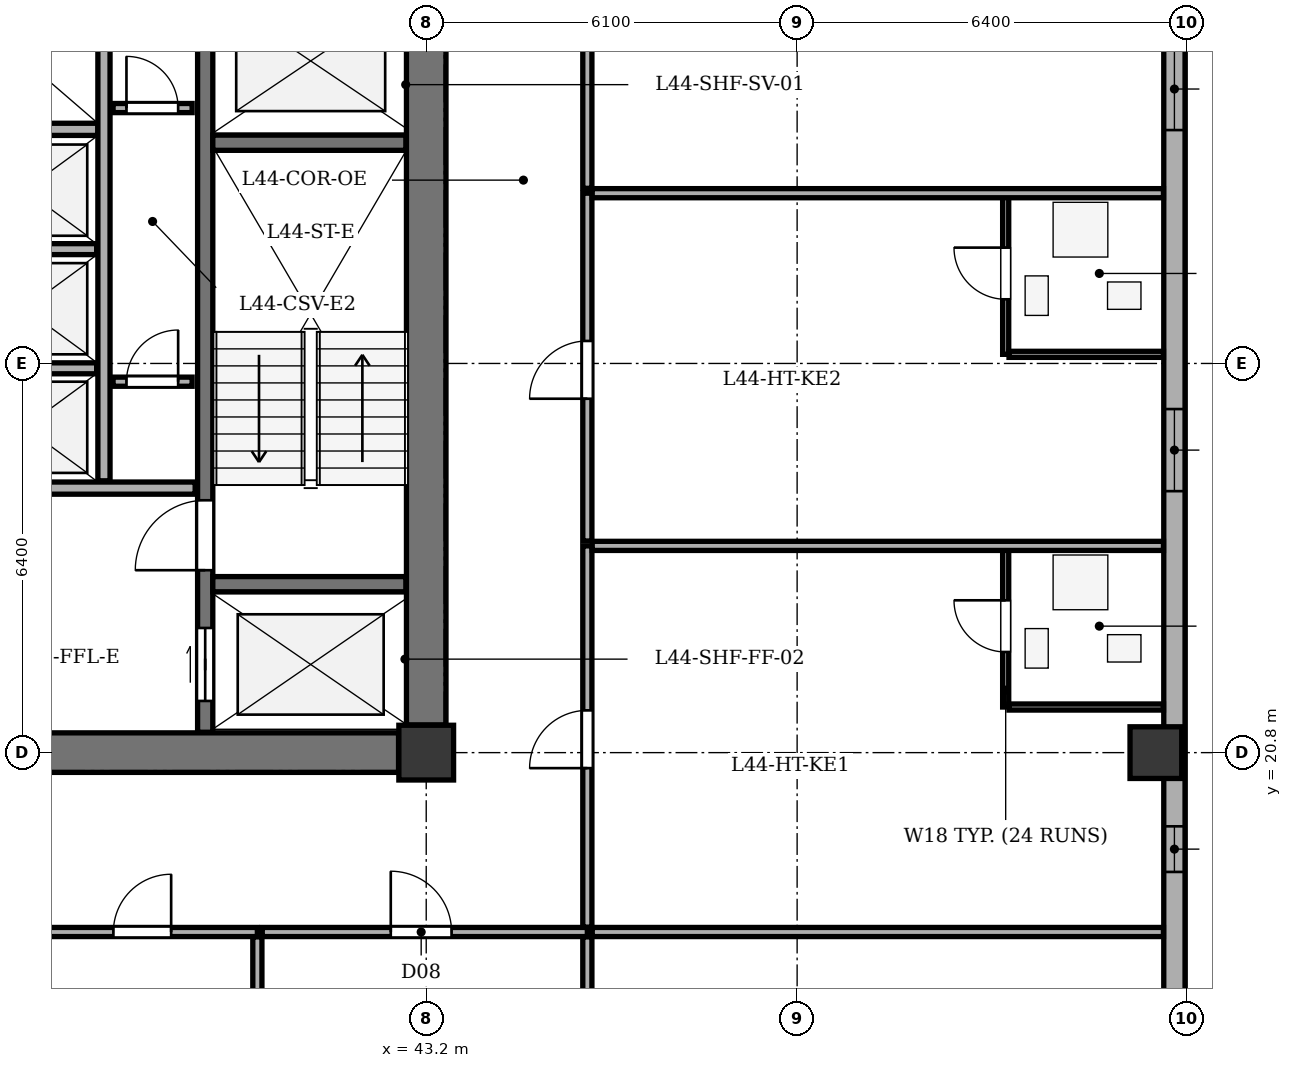
"""IFC4 building model, lengths in metres.
Left out: names, types, materials, properties, quantities, classifications, styles, units other than length and angle.
Written with IfcOpenShell. Run it as: python <this file> out.ifc"""

import sys

from ifc_helpers import new_model, si_unit, direction, frame, frame_2d, origin, origin_2d, place, context, subcontext, project, spatial, rectangle, extrude, element, fill, save


model = new_model("IFC4")
c1 = context("Model", 3, precision=1e-05, world=origin(), true_north=direction((0.0, 1.0)))
c2 = subcontext(c1, "Body", "Model", "MODEL_VIEW")
j1 = project(units=[si_unit("LENGTHUNIT", "METRE"), si_unit("PLANEANGLEUNIT", "RADIAN")], contexts=[c1])
p1 = place(None, origin())
s1 = spatial("IfcSite", under=j1, at=p1, CompositionType="ELEMENT")
p2 = place(p1, origin())
s2 = spatial("IfcBuilding", under=s1, at=p2, CompositionType="ELEMENT")
p3 = place(p2, frame((0.0, 0.0, 172.8)))
s3 = spatial("IfcBuildingStorey", under=s2, at=p3, CompositionType="ELEMENT", Elevation=172.8)
p4 = place(p3, frame((43.2, 20.8, 0.0), z_axis=(0.0, 0.0, 1.0), x_axis=(1.0, 0.0, 0.0)))
e1 = element("IfcColumn", 1, at=p4, inside=s3, PredefinedType="COLUMN", context=c2, shape_type="SweptSolid", body=[
    extrude(rectangle(XDim=0.9, YDim=0.9, at=origin_2d()), origin(), (0.0, 0.0, 1.0), 3.5),
])
p5 = place(p3, frame((55.2, 20.8, 0.0), z_axis=(0.0, 0.0, 1.0), x_axis=(1.0, 0.0, 0.0)))
e2 = element("IfcColumn", 2, at=p5, inside=s3, PredefinedType="COLUMN", context=c2, shape_type="SweptSolid", body=[
    extrude(rectangle(XDim=0.85, YDim=0.85, at=origin_2d()), origin(), (0.0, 0.0, 1.0), 3.5),
])
p6 = place(p3, frame((55.505, 47.9, 0.0), z_axis=(0.0, 0.0, 1.0), x_axis=(0.0, -1.0, 0.0)))
e3 = element("IfcWall", 3, at=p6, inside=s3, PredefinedType="STANDARD", context=c2, shape_type="SweptSolid", body=[
    extrude(rectangle(XDim=35.0, YDim=0.35, at=frame_2d((17.5, 0.0))), origin(), (0.0, 0.0, 1.0), 2.785),
])
p7 = place(p6, frame((2.595, 0.0, 0.75)))
e4 = element("IfcOpeningElement", 4, at=p7, cuts=e3, PredefinedType="OPENING", context=c2, shape_type="SweptSolid", body=[
    extrude(rectangle(XDim=1.6, YDim=1.75, at=frame_2d((0.8, 0.875))), frame((0.0, 0.185, 0.0), z_axis=(0.0, -1.0, 0.0), x_axis=(1.0, 0.0, 0.0)), (0.0, 0.0, 1.0), 0.37),
])
p8 = place(p6, frame((7.181, 0.0, 0.75)))
e5 = element("IfcOpeningElement", 5, at=p8, cuts=e3, PredefinedType="OPENING", context=c2, shape_type="SweptSolid", body=[
    extrude(rectangle(XDim=2.1, YDim=1.75, at=frame_2d((1.05, 0.875))), frame((0.0, 0.185, 0.0), z_axis=(0.0, -1.0, 0.0), x_axis=(1.0, 0.0, 0.0)), (0.0, 0.0, 1.0), 0.37),
])
p9 = place(p6, frame((15.512, 0.0, 0.75)))
e6 = element("IfcOpeningElement", 6, at=p9, cuts=e3, PredefinedType="OPENING", context=c2, shape_type="SweptSolid", body=[
    extrude(rectangle(XDim=1.35, YDim=1.75, at=frame_2d((0.675, 0.875))), frame((0.0, 0.185, 0.0), z_axis=(0.0, -1.0, 0.0), x_axis=(1.0, 0.0, 0.0)), (0.0, 0.0, 1.0), 0.37),
])
p10 = place(p6, frame((21.45, 0.0, 0.75)))
e7 = element("IfcOpeningElement", 7, at=p10, cuts=e3, PredefinedType="OPENING", context=c2, shape_type="SweptSolid", body=[
    extrude(rectangle(XDim=1.35, YDim=1.75, at=frame_2d((0.675, 0.875))), frame((0.0, 0.185, 0.0), z_axis=(0.0, -1.0, 0.0), x_axis=(1.0, 0.0, 0.0)), (0.0, 0.0, 1.0), 0.37),
])
p11 = place(p6, frame((31.588, 0.0, 0.75)))
e8 = element("IfcOpeningElement", 8, at=p11, cuts=e3, PredefinedType="OPENING", context=c2, shape_type="SweptSolid", body=[
    extrude(rectangle(XDim=1.6, YDim=1.75, at=frame_2d((0.8, 0.875))), frame((0.0, 0.185, 0.0), z_axis=(0.0, -1.0, 0.0), x_axis=(1.0, 0.0, 0.0)), (0.0, 0.0, 1.0), 0.37),
])
p12 = place(p6, frame((28.312, 0.0, 0.75)))
e9 = element("IfcOpeningElement", 9, at=p12, cuts=e3, PredefinedType="OPENING", context=c2, shape_type="SweptSolid", body=[
    extrude(rectangle(XDim=0.75, YDim=1.45, at=frame_2d((0.375, 0.725))), frame((0.0, 0.185, 0.0), z_axis=(0.0, -1.0, 0.0), x_axis=(1.0, 0.0, 0.0)), (0.0, 0.0, 1.0), 0.37),
])
p13 = place(p3, frame((43.2, 21.255, 0.0), z_axis=(0.0, 0.0, 1.0), x_axis=(0.0, 1.0, 0.0)))
e10 = element("IfcWall", 10, at=p13, inside=s3, PredefinedType="SHEAR", context=c2, shape_type="SweptSolid", body=[
    extrude(rectangle(XDim=11.89, YDim=0.65, at=frame_2d((5.945, 0.0))), origin(), (0.0, 0.0, 1.0), 3.2),
])
p14 = place(p3, frame((35.655, 20.8, 0.0), z_axis=(0.0, 0.0, 1.0), x_axis=(1.0, 0.0, 0.0)))
e11 = element("IfcWall", 11, at=p14, inside=s3, PredefinedType="SHEAR", context=c2, shape_type="SweptSolid", body=[
    extrude(rectangle(XDim=7.09, YDim=0.65, at=frame_2d((3.545, 0.0))), origin(), (0.0, 0.0, 1.0), 3.2),
])
p15 = place(p3, frame((39.565, 21.135, 0.0), z_axis=(0.0, 0.0, 1.0), x_axis=(0.0, 1.0, 0.0)))
e12 = element("IfcWall", 12, at=p15, inside=s3, PredefinedType="SHEAR", context=c2, shape_type="SweptSolid", body=[
    extrude(rectangle(XDim=12.13, YDim=0.25, at=frame_2d((6.065, 0.0))), origin(), (0.0, 0.0, 1.0), 3.2),
])
p16 = place(p15, frame((0.515, 0.0, 0.0)))
e13 = element("IfcOpeningElement", 13, at=p16, cuts=e12, PredefinedType="OPENING", context=c2, shape_type="SweptSolid", body=[
    extrude(rectangle(XDim=1.2, YDim=2.15, at=frame_2d((0.6, 1.075))), frame((0.0, 0.135, 0.0), z_axis=(0.0, -1.0, 0.0), x_axis=(1.0, 0.0, 0.0)), (0.0, 0.0, 1.0), 0.27),
])
p17 = place(p15, frame((2.665, 0.0, 0.0)))
e14 = element("IfcOpeningElement", 14, at=p17, cuts=e12, PredefinedType="OPENING", context=c2, shape_type="SweptSolid", body=[
    extrude(rectangle(XDim=1.15, YDim=2.15, at=frame_2d((0.575, 1.075))), frame((0.0, 0.135, 0.0), z_axis=(0.0, -1.0, 0.0), x_axis=(1.0, 0.0, 0.0)), (0.0, 0.0, 1.0), 0.27),
])
for number, where, z_axis, x_axis in (
    (15, (39.69, 23.57, 0.0), (0.0, 0.0, 1.0), (1.0, 0.0, 0.0)),
    (16, (39.69, 30.83, 0.0), (0.0, 0.0, 1.0), (1.0, 0.0, 0.0)),
):
    element("IfcWall", number, at=place(p3, frame(where, z_axis=z_axis, x_axis=x_axis)), inside=s3, PredefinedType="SHEAR", context=c2, shape_type="SweptSolid", body=[
        extrude(rectangle(XDim=3.175, YDim=0.25, at=frame_2d((1.587, 0.0))), origin(), (0.0, 0.0, 1.0), 3.2),
    ])
p18 = place(p3, frame((35.535, 25.15, 0.0), z_axis=(0.0, 0.0, 1.0), x_axis=(1.0, 0.0, 0.0)))
e17 = element("IfcWall", 17, at=p18, inside=s3, PredefinedType="SOLIDWALL", context=c2, shape_type="SweptSolid", body=[
    extrude(rectangle(XDim=3.865, YDim=0.2, at=frame_2d((1.933, 0.0))), origin(), (0.0, 0.0, 1.0), 3.2),
])
p19 = place(p3, frame((35.55, 31.05, 0.0), z_axis=(0.0, 0.0, 1.0), x_axis=(1.0, 0.0, 0.0)))
e18 = element("IfcWall", 18, at=p19, inside=s3, PredefinedType="SOLIDWALL", context=c2, shape_type="SweptSolid", body=[
    extrude(rectangle(XDim=2.25, YDim=0.2, at=frame_2d((1.125, 0.0))), origin(), (0.0, 0.0, 1.0), 3.2),
])
p20 = place(p3, frame((37.9, 25.27, 0.0), z_axis=(0.0, 0.0, 1.0), x_axis=(0.0, 1.0, 0.0)))
e19 = element("IfcWall", 19, at=p20, inside=s3, PredefinedType="SOLIDWALL", context=c2, shape_type="SweptSolid", body=[
    extrude(rectangle(XDim=7.995, YDim=0.2, at=frame_2d((3.998, 0.0))), origin(), (0.0, 0.0, 1.0), 3.2),
])
for number, where, z_axis, x_axis in (
    (20, (35.535, 27.12, 0.0), (0.0, 0.0, 1.0), (1.0, 0.0, 0.0)),
    (21, (35.535, 29.08, 0.0), (0.0, 0.0, 1.0), (1.0, 0.0, 0.0)),
):
    element("IfcWall", number, at=place(p3, frame(where, z_axis=z_axis, x_axis=x_axis)), inside=s3, PredefinedType="PARTITIONING", context=c2, shape_type="SweptSolid", body=[
        extrude(rectangle(XDim=2.245, YDim=0.18, at=frame_2d((1.123, 0.0))), origin(), (0.0, 0.0, 1.0), 3.2),
    ])
p21 = place(p3, frame((38.05, 26.9, 0.0), z_axis=(0.0, 0.0, 1.0), x_axis=(1.0, 0.0, 0.0)))
e22 = element("IfcWall", 22, at=p21, inside=s3, PredefinedType="PARTITIONING", context=c2, shape_type="SweptSolid", body=[
    extrude(rectangle(XDim=1.3, YDim=0.15, at=frame_2d((0.65, 0.0))), origin(), (0.0, 0.0, 1.0), 3.2),
])
p22 = place(p21, frame((0.22, 0.0, 0.0)))
e23 = element("IfcOpeningElement", 23, at=p22, cuts=e22, PredefinedType="OPENING", context=c2, shape_type="SweptSolid", body=[
    extrude(rectangle(XDim=0.85, YDim=2.02, at=frame_2d((0.425, 1.01))), frame((0.0, 0.085, 0.0), z_axis=(0.0, -1.0, 0.0), x_axis=(1.0, 0.0, 0.0)), (0.0, 0.0, 1.0), 0.17),
])
p23 = place(p3, frame((38.05, 31.4, 0.0), z_axis=(0.0, 0.0, 1.0), x_axis=(1.0, 0.0, 0.0)))
e24 = element("IfcWall", 24, at=p23, inside=s3, PredefinedType="PARTITIONING", context=c2, shape_type="SweptSolid", body=[
    extrude(rectangle(XDim=1.3, YDim=0.15, at=frame_2d((0.65, 0.0))), origin(), (0.0, 0.0, 1.0), 3.2),
])
p24 = place(p23, frame((0.22, 0.0, 0.0)))
e25 = element("IfcOpeningElement", 25, at=p24, cuts=e24, PredefinedType="OPENING", context=c2, shape_type="SweptSolid", body=[
    extrude(rectangle(XDim=0.85, YDim=2.02, at=frame_2d((0.425, 1.01))), frame((0.0, 0.085, 0.0), z_axis=(0.0, -1.0, 0.0), x_axis=(1.0, 0.0, 0.0)), (0.0, 0.0, 1.0), 0.17),
])
p25 = place(p3, frame((36.646, 17.85, 0.0), z_axis=(0.0, 0.0, 1.0), x_axis=(1.0, 0.0, 0.0)))
e26 = element("IfcWall", 26, at=p25, inside=s3, PredefinedType="PARTITIONING", context=c2, shape_type="SweptSolid", body=[
    extrude(rectangle(XDim=3.777, YDim=0.15, at=frame_2d((1.889, 0.0))), origin(), (0.0, 0.0, 1.0), 3.2),
])
p26 = place(p25, frame((1.409, 0.0, 0.0)))
e27 = element("IfcOpeningElement", 27, at=p26, cuts=e26, PredefinedType="OPENING", context=c2, shape_type="SweptSolid", body=[
    extrude(rectangle(XDim=0.95, YDim=2.1, at=frame_2d((0.475, 1.05))), frame((0.0, 0.085, 0.0), z_axis=(0.0, -1.0, 0.0), x_axis=(1.0, 0.0, 0.0)), (0.0, 0.0, 1.0), 0.17),
])
p27 = place(p3, frame((40.423, 8.275, 0.0), z_axis=(0.0, 0.0, 1.0), x_axis=(0.0, 1.0, 0.0)))
e28 = element("IfcWall", 28, at=p27, inside=s3, PredefinedType="PARTITIONING", context=c2, shape_type="SweptSolid", body=[
    extrude(rectangle(XDim=9.495, YDim=0.15, at=frame_2d((4.748, 0.0))), origin(), (0.0, 0.0, 1.0), 3.2),
])
p28 = place(p3, frame((40.503, 17.85, 0.0), z_axis=(0.0, 0.0, 1.0), x_axis=(1.0, 0.0, 0.0)))
e29 = element("IfcWall", 29, at=p28, inside=s3, PredefinedType="PARTITIONING", context=c2, shape_type="SweptSolid", body=[
    extrude(rectangle(XDim=5.347, YDim=0.15, at=frame_2d((2.674, 0.0))), origin(), (0.0, 0.0, 1.0), 3.2),
])
p29 = place(p28, frame((2.114, 0.0, 0.0)))
e30 = element("IfcOpeningElement", 30, at=p29, cuts=e29, PredefinedType="OPENING", context=c2, shape_type="SweptSolid", body=[
    extrude(rectangle(XDim=1.0, YDim=2.1, at=frame_2d((0.5, 1.05))), frame((0.0, 0.085, 0.0), z_axis=(0.0, -1.0, 0.0), x_axis=(1.0, 0.0, 0.0)), (0.0, 0.0, 1.0), 0.17),
])
p30 = place(p3, frame((45.85, 8.275, 0.0), z_axis=(0.0, 0.0, 1.0), x_axis=(0.0, 1.0, 0.0)))
e31 = element("IfcWall", 31, at=p30, inside=s3, PredefinedType="PARTITIONING", context=c2, shape_type="SweptSolid", body=[
    extrude(rectangle(XDim=9.495, YDim=0.15, at=frame_2d((4.748, 0.0))), origin(), (0.0, 0.0, 1.0), 3.2),
])
p31 = place(p3, frame((45.93, 17.85, 0.0), z_axis=(0.0, 0.0, 1.0), x_axis=(1.0, 0.0, 0.0)))
e32 = element("IfcWall", 32, at=p31, inside=s3, PredefinedType="PARTITIONING", context=c2, shape_type="SweptSolid", body=[
    extrude(rectangle(XDim=9.395, YDim=0.15, at=frame_2d((4.698, 0.0))), origin(), (0.0, 0.0, 1.0), 3.2),
])
p32 = place(p3, frame((45.85, 17.93, 0.0), z_axis=(0.0, 0.0, 1.0), x_axis=(0.0, 1.0, 0.0)))
e33 = element("IfcWall", 33, at=p32, inside=s3, PredefinedType="PARTITIONING", context=c2, shape_type="SweptSolid", body=[
    extrude(rectangle(XDim=6.27, YDim=0.15, at=frame_2d((3.135, 0.0))), origin(), (0.0, 0.0, 1.0), 3.2),
])
p33 = place(p32, frame((2.615, 0.0, 0.0)))
e34 = element("IfcOpeningElement", 34, at=p33, cuts=e33, PredefinedType="OPENING", context=c2, shape_type="SweptSolid", body=[
    extrude(rectangle(XDim=0.95, YDim=2.1, at=frame_2d((0.475, 1.05))), frame((0.0, 0.085, 0.0), z_axis=(0.0, -1.0, 0.0), x_axis=(1.0, 0.0, 0.0)), (0.0, 0.0, 1.0), 0.17),
])
p34 = place(p3, frame((52.73, 21.55, 0.0), z_axis=(0.0, 0.0, 1.0), x_axis=(0.0, 1.0, 0.0)))
e35 = element("IfcWall", 35, at=p34, inside=s3, PredefinedType="PARTITIONING", context=c2, shape_type="SweptSolid", body=[
    extrude(rectangle(XDim=2.65, YDim=0.1, at=frame_2d((1.325, 0.0))), origin(), (0.0, 0.0, 1.0), 3.2),
])
p35 = place(p34, frame((0.905, 0.0, 0.0)))
e36 = element("IfcOpeningElement", 36, at=p35, cuts=e35, PredefinedType="OPENING", context=c2, shape_type="SweptSolid", body=[
    extrude(rectangle(XDim=0.85, YDim=2.05, at=frame_2d((0.425, 1.025))), frame((0.0, 0.06, 0.0), z_axis=(0.0, -1.0, 0.0), x_axis=(1.0, 0.0, 0.0)), (0.0, 0.0, 1.0), 0.12),
])
p36 = place(p3, frame((52.785, 21.55, 0.0), z_axis=(0.0, 0.0, 1.0), x_axis=(1.0, 0.0, 0.0)))
e37 = element("IfcWall", 37, at=p36, inside=s3, PredefinedType="PARTITIONING", context=c2, shape_type="SweptSolid", body=[
    extrude(rectangle(XDim=2.54, YDim=0.1, at=frame_2d((1.27, 0.0))), origin(), (0.0, 0.0, 1.0), 3.2),
])
p37 = place(p3, frame((45.93, 24.2, 0.0), z_axis=(0.0, 0.0, 1.0), x_axis=(1.0, 0.0, 0.0)))
e38 = element("IfcWall", 38, at=p37, inside=s3, PredefinedType="PARTITIONING", context=c2, shape_type="SweptSolid", body=[
    extrude(rectangle(XDim=9.395, YDim=0.15, at=frame_2d((4.698, 0.0))), origin(), (0.0, 0.0, 1.0), 3.2),
])
p38 = place(p3, frame((45.85, 24.28, 0.0), z_axis=(0.0, 0.0, 1.0), x_axis=(0.0, 1.0, 0.0)))
e39 = element("IfcWall", 39, at=p38, inside=s3, PredefinedType="PARTITIONING", context=c2, shape_type="SweptSolid", body=[
    extrude(rectangle(XDim=5.72, YDim=0.15, at=frame_2d((2.86, 0.0))), origin(), (0.0, 0.0, 1.0), 3.2),
])
p39 = place(p38, frame((2.34, 0.0, 0.0)))
e40 = element("IfcOpeningElement", 40, at=p39, cuts=e39, PredefinedType="OPENING", context=c2, shape_type="SweptSolid", body=[
    extrude(rectangle(XDim=0.95, YDim=2.1, at=frame_2d((0.475, 1.05))), frame((0.0, 0.085, 0.0), z_axis=(0.0, -1.0, 0.0), x_axis=(1.0, 0.0, 0.0)), (0.0, 0.0, 1.0), 0.17),
])
p40 = place(p3, frame((52.73, 27.35, 0.0), z_axis=(0.0, 0.0, 1.0), x_axis=(0.0, 1.0, 0.0)))
e41 = element("IfcWall", 41, at=p40, inside=s3, PredefinedType="PARTITIONING", context=c2, shape_type="SweptSolid", body=[
    extrude(rectangle(XDim=2.65, YDim=0.1, at=frame_2d((1.325, 0.0))), origin(), (0.0, 0.0, 1.0), 3.2),
])
p41 = place(p40, frame((0.905, 0.0, 0.0)))
e42 = element("IfcOpeningElement", 42, at=p41, cuts=e41, PredefinedType="OPENING", context=c2, shape_type="SweptSolid", body=[
    extrude(rectangle(XDim=0.85, YDim=2.05, at=frame_2d((0.425, 1.025))), frame((0.0, 0.06, 0.0), z_axis=(0.0, -1.0, 0.0), x_axis=(1.0, 0.0, 0.0)), (0.0, 0.0, 1.0), 0.12),
])
p42 = place(p3, frame((52.785, 27.35, 0.0), z_axis=(0.0, 0.0, 1.0), x_axis=(1.0, 0.0, 0.0)))
e43 = element("IfcWall", 43, at=p42, inside=s3, PredefinedType="PARTITIONING", context=c2, shape_type="SweptSolid", body=[
    extrude(rectangle(XDim=2.54, YDim=0.1, at=frame_2d((1.27, 0.0))), origin(), (0.0, 0.0, 1.0), 3.2),
])
p43 = place(p3, frame((45.93, 30.0, 0.0), z_axis=(0.0, 0.0, 1.0), x_axis=(1.0, 0.0, 0.0)))
e44 = element("IfcWall", 44, at=p43, inside=s3, PredefinedType="PARTITIONING", context=c2, shape_type="SweptSolid", body=[
    extrude(rectangle(XDim=9.395, YDim=0.15, at=frame_2d((4.698, 0.0))), origin(), (0.0, 0.0, 1.0), 3.2),
])
p44 = place(p3, frame((45.85, 30.08, 0.0), z_axis=(0.0, 0.0, 1.0), x_axis=(0.0, 1.0, 0.0)))
e45 = element("IfcWall", 45, at=p44, inside=s3, PredefinedType="PARTITIONING", context=c2, shape_type="SweptSolid", body=[
    extrude(rectangle(XDim=6.39, YDim=0.15, at=frame_2d((3.195, 0.0))), origin(), (0.0, 0.0, 1.0), 3.2),
])
p45 = place(p44, frame((2.715, 0.0, 0.0)))
e46 = element("IfcOpeningElement", 46, at=p45, cuts=e45, PredefinedType="OPENING", context=c2, shape_type="SweptSolid", body=[
    extrude(rectangle(XDim=0.95, YDim=2.1, at=frame_2d((0.475, 1.05))), frame((0.0, 0.085, 0.0), z_axis=(0.0, -1.0, 0.0), x_axis=(1.0, 0.0, 0.0)), (0.0, 0.0, 1.0), 0.17),
])
p46 = place(p9, origin())
e47 = element("IfcWindow", 47, at=p46, inside=s3, PartitioningType="SINGLE_PANEL", PredefinedType="WINDOW", context=c2, shape_type="SweptSolid", body=[
    extrude(rectangle(XDim=1.35, YDim=1.75, at=frame_2d((0.675, 0.875))), frame((0.0, -0.01, 0.0), z_axis=(0.0, -1.0, 0.0), x_axis=(1.0, 0.0, 0.0)), (0.0, 0.0, 1.0), 0.06),
])
fill(e6, e47)
p47 = place(p10, origin())
e48 = element("IfcWindow", 48, at=p47, inside=s3, PartitioningType="SINGLE_PANEL", PredefinedType="WINDOW", context=c2, shape_type="SweptSolid", body=[
    extrude(rectangle(XDim=1.35, YDim=1.75, at=frame_2d((0.675, 0.875))), frame((0.0, -0.01, 0.0), z_axis=(0.0, -1.0, 0.0), x_axis=(1.0, 0.0, 0.0)), (0.0, 0.0, 1.0), 0.06),
])
fill(e7, e48)
p48 = place(p12, origin())
e49 = element("IfcWindow", 49, at=p48, inside=s3, PartitioningType="SINGLE_PANEL", PredefinedType="WINDOW", context=c2, shape_type="SweptSolid", body=[
    extrude(rectangle(XDim=0.75, YDim=1.45, at=frame_2d((0.375, 0.725))), frame((0.0, -0.01, 0.0), z_axis=(0.0, -1.0, 0.0), x_axis=(1.0, 0.0, 0.0)), (0.0, 0.0, 1.0), 0.06),
])
fill(e9, e49)
p49 = place(p16, origin())
e50 = element("IfcDoor", 50, at=p49, inside=s3, OperationType="DOUBLE_DOOR_SLIDING", PredefinedType="DOOR", context=c2, shape_type="SweptSolid", body=[
    extrude(rectangle(XDim=1.2, YDim=2.15, at=frame_2d((0.6, 1.075))), frame((0.0, 0.025, 0.0), z_axis=(0.0, -1.0, 0.0), x_axis=(1.0, 0.0, 0.0)), (0.0, 0.0, 1.0), 0.05),
])
fill(e13, e50)
p50 = place(p17, origin())
e51 = element("IfcDoor", 51, at=p50, inside=s3, OperationType="SINGLE_SWING_LEFT", PredefinedType="DOOR", context=c2, shape_type="SweptSolid", body=[
    extrude(rectangle(XDim=1.15, YDim=2.15, at=frame_2d((0.575, 1.075))), frame((0.0, 0.025, 0.0), z_axis=(0.0, -1.0, 0.0), x_axis=(1.0, 0.0, 0.0)), (0.0, 0.0, 1.0), 0.05),
])
fill(e14, e51)
p51 = place(p22, origin())
e52 = element("IfcDoor", 52, at=p51, inside=s3, OperationType="SINGLE_SWING_RIGHT", PredefinedType="DOOR", context=c2, shape_type="SweptSolid", body=[
    extrude(rectangle(XDim=0.85, YDim=2.02, at=frame_2d((0.425, 1.01))), frame((0.0, 0.025, 0.0), z_axis=(0.0, -1.0, 0.0), x_axis=(1.0, 0.0, 0.0)), (0.0, 0.0, 1.0), 0.05),
])
fill(e23, e52)
p52 = place(p24, origin())
e53 = element("IfcDoor", 53, at=p52, inside=s3, OperationType="SINGLE_SWING_LEFT", PredefinedType="DOOR", context=c2, shape_type="SweptSolid", body=[
    extrude(rectangle(XDim=0.85, YDim=2.02, at=frame_2d((0.425, 1.01))), frame((0.0, 0.025, 0.0), z_axis=(0.0, -1.0, 0.0), x_axis=(1.0, 0.0, 0.0)), (0.0, 0.0, 1.0), 0.05),
])
fill(e25, e53)
p53 = place(p26, origin())
e54 = element("IfcDoor", 54, at=p53, inside=s3, OperationType="SINGLE_SWING_RIGHT", PredefinedType="DOOR", context=c2, shape_type="SweptSolid", body=[
    extrude(rectangle(XDim=0.95, YDim=2.1, at=frame_2d((0.475, 1.05))), frame((0.0, 0.025, 0.0), z_axis=(0.0, -1.0, 0.0), x_axis=(1.0, 0.0, 0.0)), (0.0, 0.0, 1.0), 0.05),
])
fill(e27, e54)
p54 = place(p29, origin())
e55 = element("IfcDoor", 55, at=p54, inside=s3, OperationType="SINGLE_SWING_LEFT", PredefinedType="DOOR", context=c2, shape_type="SweptSolid", body=[
    extrude(rectangle(XDim=1.0, YDim=2.1, at=frame_2d((0.5, 1.05))), frame((0.0, 0.025, 0.0), z_axis=(0.0, -1.0, 0.0), x_axis=(1.0, 0.0, 0.0)), (0.0, 0.0, 1.0), 0.05),
])
fill(e30, e55)
p55 = place(p35, origin())
e56 = element("IfcDoor", 56, at=p55, inside=s3, OperationType="SINGLE_SWING_RIGHT", PredefinedType="DOOR", context=c2, shape_type="SweptSolid", body=[
    extrude(rectangle(XDim=0.85, YDim=2.05, at=frame_2d((0.425, 1.025))), frame((0.0, 0.025, 0.0), z_axis=(0.0, -1.0, 0.0), x_axis=(1.0, 0.0, 0.0)), (0.0, 0.0, 1.0), 0.05),
])
fill(e36, e56)
p56 = place(p33, origin())
e57 = element("IfcDoor", 57, at=p56, inside=s3, OperationType="SINGLE_SWING_LEFT", PredefinedType="DOOR", context=c2, shape_type="SweptSolid", body=[
    extrude(rectangle(XDim=0.95, YDim=2.1, at=frame_2d((0.475, 1.05))), frame((0.0, 0.025, 0.0), z_axis=(0.0, -1.0, 0.0), x_axis=(1.0, 0.0, 0.0)), (0.0, 0.0, 1.0), 0.05),
])
fill(e34, e57)
p57 = place(p41, origin())
e58 = element("IfcDoor", 58, at=p57, inside=s3, OperationType="SINGLE_SWING_RIGHT", PredefinedType="DOOR", context=c2, shape_type="SweptSolid", body=[
    extrude(rectangle(XDim=0.85, YDim=2.05, at=frame_2d((0.425, 1.025))), frame((0.0, 0.025, 0.0), z_axis=(0.0, -1.0, 0.0), x_axis=(1.0, 0.0, 0.0)), (0.0, 0.0, 1.0), 0.05),
])
fill(e42, e58)
p58 = place(p39, origin())
e59 = element("IfcDoor", 59, at=p58, inside=s3, OperationType="SINGLE_SWING_LEFT", PredefinedType="DOOR", context=c2, shape_type="SweptSolid", body=[
    extrude(rectangle(XDim=0.95, YDim=2.1, at=frame_2d((0.475, 1.05))), frame((0.0, 0.025, 0.0), z_axis=(0.0, -1.0, 0.0), x_axis=(1.0, 0.0, 0.0)), (0.0, 0.0, 1.0), 0.05),
])
fill(e40, e59)
save(model, sys.argv[1])
